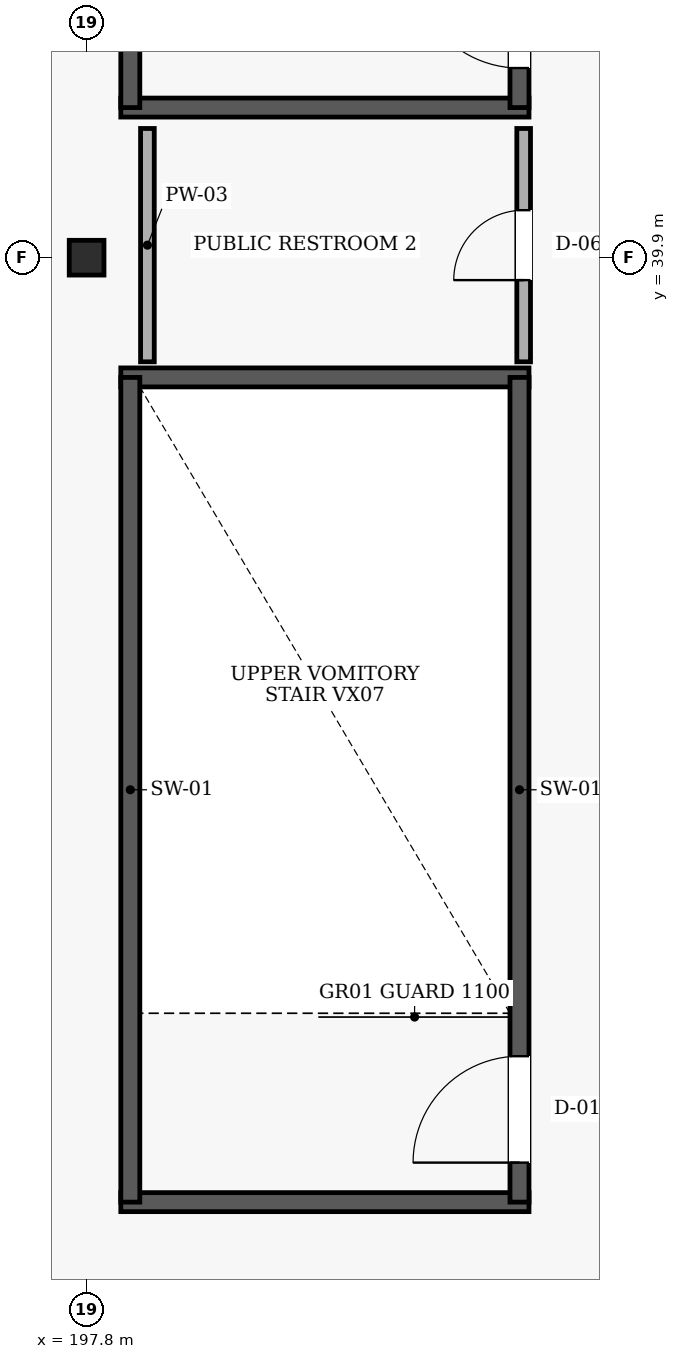
"""IFC4 building model, lengths in metres.
Left out: names, types, materials, properties, quantities, classifications, styles, units other than length and angle.
Written with IfcOpenShell. Run it as: python <this file> out.ifc"""

import sys

from ifc_helpers import new_model, si_unit, direction, frame, frame_2d, origin, origin_2d, place, context, subcontext, project, spatial, rectangle, hollow_circle, extrude, element, fill, save


model = new_model("IFC4")
c1 = context("Model", 3, precision=1e-05, world=origin(), true_north=direction((0.0, 1.0)))
c2 = subcontext(c1, "Body", "Model", "MODEL_VIEW")
j1 = project(units=[si_unit("LENGTHUNIT", "METRE"), si_unit("PLANEANGLEUNIT", "RADIAN")], contexts=[c1])
p1 = place(None, origin())
s1 = spatial("IfcSite", under=j1, at=p1, CompositionType="ELEMENT")
p2 = place(p1, origin())
s2 = spatial("IfcBuilding", under=s1, at=p2, CompositionType="ELEMENT")
p3 = place(p2, frame((0.0, 0.0, 15.0)))
s3 = spatial("IfcBuildingStorey", under=s2, at=p3, CompositionType="ELEMENT", Elevation=15.0)
p4 = place(p3, frame((197.8, 39.9, 0.0), z_axis=(0.0, 0.0, 1.0), x_axis=(1.0, 0.0, 0.0)))
e1 = element("IfcColumn", 1, at=p4, inside=s3, PredefinedType="COLUMN", context=c2, shape_type="SweptSolid", body=[
    extrude(hollow_circle(Radius=0.229, WallThickness=0.02, at=origin_2d()), origin(), (0.0, 0.0, 1.0), 4.8),
])
for number, where, z_axis, x_axis in (
    (2, (198.25, 27.475, 0.0), (0.0, 0.0, 1.0), (1.0, 0.0, 0.0)),
    (3, (203.62, 38.325, 0.0), (0.0, 0.0, 1.0), (-1.0, 0.0, 0.0)),
):
    element("IfcWall", number, at=place(p3, frame(where, z_axis=z_axis, x_axis=x_axis)), inside=s3, PredefinedType="SHEAR", context=c2, shape_type="SweptSolid", body=[
        extrude(rectangle(XDim=5.37, YDim=0.25, at=frame_2d((2.685, 0.0))), origin(), (0.0, 0.0, 1.0), 4.5),
    ])
p5 = place(p3, frame((198.375, 27.475, 0.0), z_axis=(0.0, 0.0, 1.0), x_axis=(0.0, 1.0, 0.0)))
e4 = element("IfcWall", 4, at=p5, inside=s3, PredefinedType="SHEAR", context=c2, shape_type="SweptSolid", body=[
    extrude(rectangle(XDim=10.85, YDim=0.25, at=frame_2d((5.425, 0.0))), origin(), (0.0, 0.0, 1.0), 4.5),
])
p6 = place(p3, frame((203.495, 27.475, 0.0), z_axis=(0.0, 0.0, 1.0), x_axis=(0.0, 1.0, 0.0)))
e5 = element("IfcWall", 5, at=p6, inside=s3, PredefinedType="SHEAR", context=c2, shape_type="SweptSolid", body=[
    extrude(rectangle(XDim=10.85, YDim=0.25, at=frame_2d((5.425, 0.0))), origin(), (0.0, 0.0, 1.0), 4.5),
])
p7 = place(p6, frame((0.52, 0.0, 0.0)))
e6 = element("IfcOpeningElement", 6, at=p7, cuts=e5, PredefinedType="OPENING", context=c2, shape_type="SweptSolid", body=[
    extrude(rectangle(XDim=1.4, YDim=2.15, at=frame_2d((0.7, 1.075))), frame((0.0, 0.135, 0.0), z_axis=(0.0, -1.0, 0.0), x_axis=(1.0, 0.0, 0.0)), (0.0, 0.0, 1.0), 0.27),
])
p8 = place(p3, frame((198.25, 41.875, 0.0), z_axis=(0.0, 0.0, 1.0), x_axis=(1.0, 0.0, 0.0)))
e7 = element("IfcWall", 7, at=p8, inside=s3, PredefinedType="SHEAR", context=c2, shape_type="SweptSolid", body=[
    extrude(rectangle(XDim=5.37, YDim=0.25, at=frame_2d((2.685, 0.0))), origin(), (0.0, 0.0, 1.0), 4.5),
])
p9 = place(p3, frame((198.375, 41.875, 0.0), z_axis=(0.0, 0.0, 1.0), x_axis=(0.0, 1.0, 0.0)))
e8 = element("IfcWall", 8, at=p9, inside=s3, PredefinedType="SHEAR", context=c2, shape_type="SweptSolid", body=[
    extrude(rectangle(XDim=10.85, YDim=0.25, at=frame_2d((5.425, 0.0))), origin(), (0.0, 0.0, 1.0), 4.5),
])
p10 = place(p3, frame((203.495, 41.875, 0.0), z_axis=(0.0, 0.0, 1.0), x_axis=(0.0, 1.0, 0.0)))
e9 = element("IfcWall", 9, at=p10, inside=s3, PredefinedType="SHEAR", context=c2, shape_type="SweptSolid", body=[
    extrude(rectangle(XDim=10.85, YDim=0.25, at=frame_2d((5.425, 0.0))), origin(), (0.0, 0.0, 1.0), 4.5),
])
p11 = place(p10, frame((0.52, 0.0, 0.0)))
e10 = element("IfcOpeningElement", 10, at=p11, cuts=e9, PredefinedType="OPENING", context=c2, shape_type="SweptSolid", body=[
    extrude(rectangle(XDim=1.4, YDim=2.15, at=frame_2d((0.7, 1.075))), frame((0.0, 0.135, 0.0), z_axis=(0.0, -1.0, 0.0), x_axis=(1.0, 0.0, 0.0)), (0.0, 0.0, 1.0), 0.27),
])
p12 = place(p3, frame((203.55, 38.53, 0.0), z_axis=(0.0, 0.0, 1.0), x_axis=(0.0, 1.0, 0.0)))
e11 = element("IfcWall", 11, at=p12, inside=s3, PredefinedType="PARTITIONING", context=c2, shape_type="SweptSolid", body=[
    extrude(rectangle(XDim=3.07, YDim=0.18, at=frame_2d((1.535, 0.0))), origin(), (0.0, 0.0, 1.0), 4.5),
])
p13 = place(p12, frame((1.075, 0.0, 0.0)))
e12 = element("IfcOpeningElement", 12, at=p13, cuts=e11, PredefinedType="OPENING", context=c2, shape_type="SweptSolid", body=[
    extrude(rectangle(XDim=0.92, YDim=2.1, at=frame_2d((0.46, 1.05))), frame((0.0, 0.1, 0.0), z_axis=(0.0, -1.0, 0.0), x_axis=(1.0, 0.0, 0.0)), (0.0, 0.0, 1.0), 0.2),
])
p14 = place(p3, frame((198.6, 41.6, 0.0), z_axis=(0.0, 0.0, 1.0), x_axis=(0.0, -1.0, 0.0)))
e13 = element("IfcWall", 13, at=p14, inside=s3, PredefinedType="PARTITIONING", context=c2, shape_type="SweptSolid", body=[
    extrude(rectangle(XDim=3.07, YDim=0.18, at=frame_2d((1.535, 0.0))), origin(), (0.0, 0.0, 1.0), 4.5),
])
p15 = place(p7, origin())
e14 = element("IfcDoor", 14, at=p15, inside=s3, OperationType="SINGLE_SWING_LEFT", PredefinedType="DOOR", context=c2, shape_type="SweptSolid", body=[
    extrude(rectangle(XDim=1.4, YDim=2.15, at=frame_2d((0.7, 1.075))), frame((0.0, 0.025, 0.0), z_axis=(0.0, -1.0, 0.0), x_axis=(1.0, 0.0, 0.0)), (0.0, 0.0, 1.0), 0.05),
])
fill(e6, e14)
p16 = place(p11, origin())
e15 = element("IfcDoor", 15, at=p16, inside=s3, OperationType="SINGLE_SWING_RIGHT", PredefinedType="DOOR", context=c2, shape_type="SweptSolid", body=[
    extrude(rectangle(XDim=1.4, YDim=2.15, at=frame_2d((0.7, 1.075))), frame((0.0, 0.025, 0.0), z_axis=(0.0, -1.0, 0.0), x_axis=(1.0, 0.0, 0.0)), (0.0, 0.0, 1.0), 0.05),
])
fill(e10, e15)
p17 = place(p13, origin())
e16 = element("IfcDoor", 16, at=p17, inside=s3, OperationType="SINGLE_SWING_LEFT", PredefinedType="DOOR", context=c2, shape_type="SweptSolid", body=[
    extrude(rectangle(XDim=0.92, YDim=2.1, at=frame_2d((0.46, 1.05))), frame((0.0, 0.025, 0.0), z_axis=(0.0, -1.0, 0.0), x_axis=(1.0, 0.0, 0.0)), (0.0, 0.0, 1.0), 0.05),
])
fill(e12, e16)
save(model, sys.argv[1])
